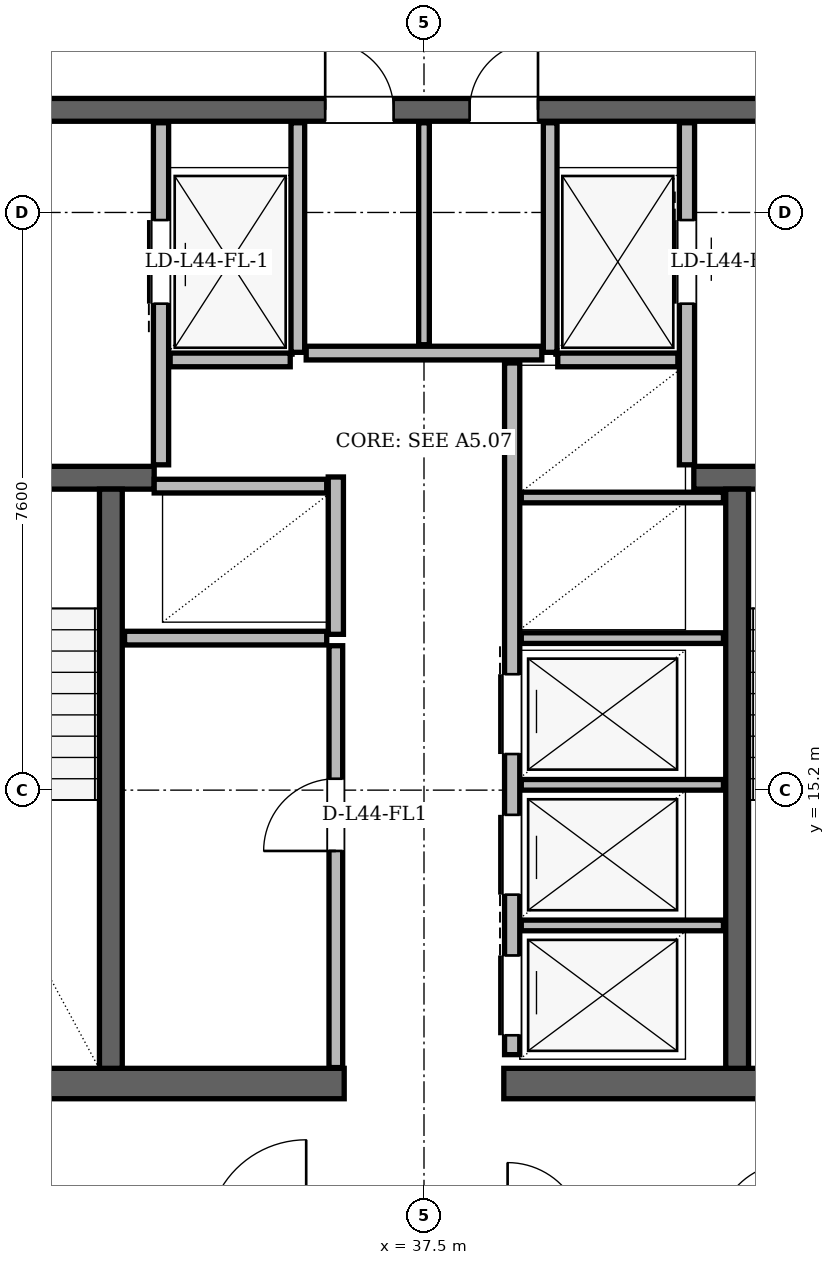
"""IFC4 building model, lengths in metres.
Left out: names, types, materials, properties, quantities, classifications, styles, units other than length and angle.
Written with IfcOpenShell. Run it as: python <this file> out.ifc"""

import sys

from ifc_helpers import new_model, si_unit, direction, frame, frame_2d, origin, place, context, subcontext, project, spatial, rectangle, extrude, element, fill, save


model = new_model("IFC4")
c1 = context("Model", 3, precision=1e-05, world=origin(), true_north=direction((0.0, 1.0)))
c2 = subcontext(c1, "Body", "Model", "MODEL_VIEW")
j1 = project(units=[si_unit("LENGTHUNIT", "METRE"), si_unit("PLANEANGLEUNIT", "RADIAN")], contexts=[c1])
p1 = place(None, origin())
s1 = spatial("IfcSite", under=j1, at=p1, CompositionType="ELEMENT")
p2 = place(p1, origin())
s2 = spatial("IfcBuilding", under=s1, at=p2, CompositionType="ELEMENT")
p3 = place(p2, frame((0.0, 0.0, 167.4)))
s3 = spatial("IfcBuildingStorey", under=s2, at=p3, CompositionType="ELEMENT", Elevation=167.4)
for number, where, z_axis, x_axis in (
    (1, (29.35, 11.34, 0.0), (0.0, 0.0, 1.0), (1.0, 0.0, 0.0)),
    (2, (38.55, 11.34, 0.0), (0.0, 0.0, 1.0), (1.0, 0.0, 0.0)),
):
    element("IfcWall", number, at=place(p3, frame(where, z_axis=z_axis, x_axis=x_axis)), inside=s3, PredefinedType="SHEAR", context=c2, shape_type="SweptSolid", body=[
        extrude(rectangle(XDim=7.1, YDim=0.4, at=frame_2d((3.55, 0.0))), origin(), (0.0, 0.0, 1.0), 3.38),
    ])
p4 = place(p3, frame((29.65, 24.15, 0.0), z_axis=(0.0, 0.0, 1.0), x_axis=(1.0, 0.0, 0.0)))
e3 = element("IfcWall", 3, at=p4, inside=s3, PredefinedType="SHEAR", context=c2, shape_type="SweptSolid", body=[
    extrude(rectangle(XDim=15.7, YDim=0.3, at=frame_2d((7.85, 0.0))), origin(), (0.0, 0.0, 1.0), 3.38),
])
p5 = place(p4, frame((1.7, 0.0, 0.0)))
e4 = element("IfcOpeningElement", 4, at=p5, cuts=e3, PredefinedType="OPENING", context=c2, shape_type="SweptSolid", body=[
    extrude(rectangle(XDim=1.2, YDim=2.2, at=frame_2d((0.6, 1.1))), frame((0.0, 0.15, 0.0), z_axis=(0.0, -1.0, 0.0), x_axis=(1.0, 0.0, 0.0)), (0.0, 0.0, 1.0), 0.3),
])
p6 = place(p4, frame((12.8, 0.0, 0.0)))
e5 = element("IfcOpeningElement", 5, at=p6, cuts=e3, PredefinedType="OPENING", context=c2, shape_type="SweptSolid", body=[
    extrude(rectangle(XDim=1.2, YDim=2.2, at=frame_2d((0.6, 1.1))), frame((0.0, 0.15, 0.0), z_axis=(0.0, -1.0, 0.0), x_axis=(1.0, 0.0, 0.0)), (0.0, 0.0, 1.0), 0.3),
])
p7 = place(p4, frame((6.55, 0.0, 0.0)))
e6 = element("IfcOpeningElement", 6, at=p7, cuts=e3, PredefinedType="OPENING", context=c2, shape_type="SweptSolid", body=[
    extrude(rectangle(XDim=0.9, YDim=2.05, at=frame_2d((0.45, 1.025))), frame((0.0, 0.15, 0.0), z_axis=(0.0, -1.0, 0.0), x_axis=(1.0, 0.0, 0.0)), (0.0, 0.0, 1.0), 0.3),
])
p8 = place(p4, frame((8.45, 0.0, 0.0)))
e7 = element("IfcOpeningElement", 7, at=p8, cuts=e3, PredefinedType="OPENING", context=c2, shape_type="SweptSolid", body=[
    extrude(rectangle(XDim=0.9, YDim=2.05, at=frame_2d((0.45, 1.025))), frame((0.0, 0.15, 0.0), z_axis=(0.0, -1.0, 0.0), x_axis=(1.0, 0.0, 0.0)), (0.0, 0.0, 1.0), 0.3),
])
p9 = place(p3, frame((29.94, 19.31, 0.0), z_axis=(0.0, 0.0, 1.0), x_axis=(1.0, 0.0, 0.0)))
e8 = element("IfcWall", 8, at=p9, inside=s3, PredefinedType="SHEAR", context=c2, shape_type="SweptSolid", body=[
    extrude(rectangle(XDim=4.01, YDim=0.3, at=frame_2d((2.005, 0.0))), origin(), (0.0, 0.0, 1.0), 3.38),
])
p10 = place(p9, frame((1.01, 0.0, 0.0)))
e9 = element("IfcOpeningElement", 9, at=p10, cuts=e8, PredefinedType="OPENING", context=c2, shape_type="SweptSolid", body=[
    extrude(rectangle(XDim=1.4, YDim=2.2, at=frame_2d((0.7, 1.1))), frame((0.0, 0.15, 0.0), z_axis=(0.0, -1.0, 0.0), x_axis=(1.0, 0.0, 0.0)), (0.0, 0.0, 1.0), 0.3),
])
p11 = place(p3, frame((41.05, 19.31, 0.0), z_axis=(0.0, 0.0, 1.0), x_axis=(1.0, 0.0, 0.0)))
e10 = element("IfcWall", 10, at=p11, inside=s3, PredefinedType="SHEAR", context=c2, shape_type="SweptSolid", body=[
    extrude(rectangle(XDim=4.01, YDim=0.3, at=frame_2d((2.005, 0.0))), origin(), (0.0, 0.0, 1.0), 3.38),
])
p12 = place(p11, frame((1.6, 0.0, 0.0)))
e11 = element("IfcOpeningElement", 11, at=p12, cuts=e10, PredefinedType="OPENING", context=c2, shape_type="SweptSolid", body=[
    extrude(rectangle(XDim=1.4, YDim=2.2, at=frame_2d((0.7, 1.1))), frame((0.0, 0.15, 0.0), z_axis=(0.0, -1.0, 0.0), x_axis=(1.0, 0.0, 0.0)), (0.0, 0.0, 1.0), 0.3),
])
for number, where, z_axis, x_axis in (
    (12, (33.38, 11.54, 0.0), (0.0, 0.0, 1.0), (0.0, 1.0, 0.0)),
    (13, (41.62, 11.54, 0.0), (0.0, 0.0, 1.0), (0.0, 1.0, 0.0)),
):
    element("IfcWall", number, at=place(p3, frame(where, z_axis=z_axis, x_axis=x_axis)), inside=s3, PredefinedType="SHEAR", context=c2, shape_type="SweptSolid", body=[
        extrude(rectangle(XDim=7.62, YDim=0.3, at=frame_2d((3.81, 0.0))), origin(), (0.0, 0.0, 1.0), 3.38),
    ])
p13 = place(p3, frame((59.756, 12.279, 0.0), z_axis=(0.0, 0.0, 1.0), x_axis=(-0.499997523705, 0.86602683347, 0.0)))
e14 = element("IfcWall", 14, at=p13, inside=s3, PredefinedType="SOLIDWALL", context=c2, shape_type="SweptSolid", body=[
    extrude(rectangle(XDim=35.802, YDim=0.29, at=frame_2d((17.901, 0.0))), origin(), (0.0, 0.0, 1.0), 2.6),
])
p14 = place(p13, frame((6.579, 0.0, 0.0)))
e15 = element("IfcOpeningElement", 15, at=p14, cuts=e14, PredefinedType="OPENING", context=c2, shape_type="SweptSolid", body=[
    extrude(rectangle(XDim=1.5, YDim=2.2, at=frame_2d((0.75, 1.1))), frame((0.0, 0.145, 0.0), z_axis=(0.0, -1.0, 0.0), x_axis=(1.0, 0.0, 0.0)), (0.0, 0.0, 1.0), 0.29),
])
p15 = place(p13, frame((26.158, 0.0, 0.0)))
e16 = element("IfcOpeningElement", 16, at=p15, cuts=e14, PredefinedType="OPENING", context=c2, shape_type="SweptSolid", body=[
    extrude(rectangle(XDim=1.3, YDim=2.2, at=frame_2d((0.65, 1.1))), frame((0.0, 0.145, 0.0), z_axis=(0.0, -1.0, 0.0), x_axis=(1.0, 0.0, 0.0)), (0.0, 0.0, 1.0), 0.29),
])
p16 = place(p13, frame((1.25, 0.0, 0.85)))
e17 = element("IfcOpeningElement", 17, at=p16, cuts=e14, PredefinedType="OPENING", context=c2, shape_type="SweptSolid", body=[
    extrude(rectangle(XDim=1.2, YDim=1.48, at=frame_2d((0.6, 0.74))), frame((0.0, 0.145, 0.0), z_axis=(0.0, -1.0, 0.0), x_axis=(1.0, 0.0, 0.0)), (0.0, 0.0, 1.0), 0.29),
])
p17 = place(p13, frame((17.033, 0.0, 0.85)))
e18 = element("IfcOpeningElement", 18, at=p17, cuts=e14, PredefinedType="OPENING", context=c2, shape_type="SweptSolid", body=[
    extrude(rectangle(XDim=2.6, YDim=1.64, at=frame_2d((1.3, 0.82))), frame((0.0, 0.145, 0.0), z_axis=(0.0, -1.0, 0.0), x_axis=(1.0, 0.0, 0.0)), (0.0, 0.0, 1.0), 0.29),
])
p18 = place(p13, frame((21.982, 0.0, 0.85)))
e19 = element("IfcOpeningElement", 19, at=p18, cuts=e14, PredefinedType="OPENING", context=c2, shape_type="SweptSolid", body=[
    extrude(rectangle(XDim=2.0, YDim=1.64, at=frame_2d((1.0, 0.82))), frame((0.0, 0.145, 0.0), z_axis=(0.0, -1.0, 0.0), x_axis=(1.0, 0.0, 0.0)), (0.0, 0.0, 1.0), 0.29),
])
p19 = place(p13, frame((13.347, 0.0, 0.85)))
e20 = element("IfcOpeningElement", 20, at=p19, cuts=e14, PredefinedType="OPENING", context=c2, shape_type="SweptSolid", body=[
    extrude(rectangle(XDim=1.6, YDim=1.64, at=frame_2d((0.8, 0.82))), frame((0.0, 0.145, 0.0), z_axis=(0.0, -1.0, 0.0), x_axis=(1.0, 0.0, 0.0)), (0.0, 0.0, 1.0), 0.29),
])
p20 = place(p13, frame((31.619, 0.0, 0.85)))
e21 = element("IfcOpeningElement", 21, at=p20, cuts=e14, PredefinedType="OPENING", context=c2, shape_type="SweptSolid", body=[
    extrude(rectangle(XDim=2.6, YDim=1.64, at=frame_2d((1.3, 0.82))), frame((0.0, 0.145, 0.0), z_axis=(0.0, -1.0, 0.0), x_axis=(1.0, 0.0, 0.0)), (0.0, 0.0, 1.0), 0.29),
])
p21 = place(p3, frame((33.146, 43.285, 0.0), z_axis=(0.0, 0.0, 1.0), x_axis=(-0.499997523705, -0.86602683347, 0.0)))
e22 = element("IfcWall", 22, at=p21, inside=s3, PredefinedType="SOLIDWALL", context=c2, shape_type="SweptSolid", body=[
    extrude(rectangle(XDim=35.802, YDim=0.29, at=frame_2d((17.901, 0.0))), origin(), (0.0, 0.0, 1.0), 2.6),
])
p22 = place(p21, frame((6.76, 0.0, 0.0)))
e23 = element("IfcOpeningElement", 23, at=p22, cuts=e22, PredefinedType="OPENING", context=c2, shape_type="SweptSolid", body=[
    extrude(rectangle(XDim=1.0, YDim=2.18, at=frame_2d((0.5, 1.09))), frame((0.0, 0.145, 0.0), z_axis=(0.0, -1.0, 0.0), x_axis=(1.0, 0.0, 0.0)), (0.0, 0.0, 1.0), 0.29),
])
p23 = place(p21, frame((26.688, 0.0, 0.0)))
e24 = element("IfcOpeningElement", 24, at=p23, cuts=e22, PredefinedType="OPENING", context=c2, shape_type="SweptSolid", body=[
    extrude(rectangle(XDim=1.5, YDim=2.2, at=frame_2d((0.75, 1.1))), frame((0.0, 0.145, 0.0), z_axis=(0.0, -1.0, 0.0), x_axis=(1.0, 0.0, 0.0)), (0.0, 0.0, 1.0), 0.29),
])
p24 = place(p21, frame((33.698, 0.0, 0.85)))
e25 = element("IfcOpeningElement", 25, at=p24, cuts=e22, PredefinedType="OPENING", context=c2, shape_type="SweptSolid", body=[
    extrude(rectangle(XDim=1.2, YDim=1.48, at=frame_2d((0.6, 0.74))), frame((0.0, 0.145, 0.0), z_axis=(0.0, -1.0, 0.0), x_axis=(1.0, 0.0, 0.0)), (0.0, 0.0, 1.0), 0.29),
])
p25 = place(p21, frame((22.123, 0.0, 0.85)))
e26 = element("IfcOpeningElement", 26, at=p25, cuts=e22, PredefinedType="OPENING", context=c2, shape_type="SweptSolid", body=[
    extrude(rectangle(XDim=1.2, YDim=1.48, at=frame_2d((0.6, 0.74))), frame((0.0, 0.145, 0.0), z_axis=(0.0, -1.0, 0.0), x_axis=(1.0, 0.0, 0.0)), (0.0, 0.0, 1.0), 0.29),
])
p26 = place(p21, frame((12.284, 0.0, 0.85)))
e27 = element("IfcOpeningElement", 27, at=p26, cuts=e22, PredefinedType="OPENING", context=c2, shape_type="SweptSolid", body=[
    extrude(rectangle(XDim=1.6, YDim=1.64, at=frame_2d((0.8, 0.82))), frame((0.0, 0.145, 0.0), z_axis=(0.0, -1.0, 0.0), x_axis=(1.0, 0.0, 0.0)), (0.0, 0.0, 1.0), 0.29),
])
p27 = place(p21, frame((17.539, 0.0, 0.85)))
e28 = element("IfcOpeningElement", 28, at=p27, cuts=e22, PredefinedType="OPENING", context=c2, shape_type="SweptSolid", body=[
    extrude(rectangle(XDim=3.0, YDim=1.64, at=frame_2d((1.5, 0.82))), frame((0.0, 0.145, 0.0), z_axis=(0.0, -1.0, 0.0), x_axis=(1.0, 0.0, 0.0)), (0.0, 0.0, 1.0), 0.29),
])
p28 = place(p21, frame((1.23, 0.0, 0.85)))
e29 = element("IfcOpeningElement", 29, at=p28, cuts=e22, PredefinedType="OPENING", context=c2, shape_type="SweptSolid", body=[
    extrude(rectangle(XDim=1.2, YDim=1.48, at=frame_2d((0.6, 0.74))), frame((0.0, 0.145, 0.0), z_axis=(0.0, -1.0, 0.0), x_axis=(1.0, 0.0, 0.0)), (0.0, 0.0, 1.0), 0.29),
])
p29 = place(p21, frame((30.487, 0.0, 0.85)))
e30 = element("IfcOpeningElement", 30, at=p29, cuts=e22, PredefinedType="OPENING", context=c2, shape_type="SweptSolid", body=[
    extrude(rectangle(XDim=1.2, YDim=1.48, at=frame_2d((0.6, 0.74))), frame((0.0, 0.145, 0.0), z_axis=(0.0, -1.0, 0.0), x_axis=(1.0, 0.0, 0.0)), (0.0, 0.0, 1.0), 0.29),
])
p30 = place(p3, frame((34.04, 19.48, 0.0), z_axis=(0.0, 0.0, 1.0), x_axis=(0.0, 1.0, 0.0)))
e31 = element("IfcWall", 31, at=p30, inside=s3, PredefinedType="PARTITIONING", context=c2, shape_type="SweptSolid", body=[
    extrude(rectangle(XDim=4.5, YDim=0.2, at=frame_2d((2.25, 0.0))), origin(), (0.0, 0.0, 1.0), 3.38),
])
p31 = place(p30, frame((2.12, 0.0, 0.0)))
e32 = element("IfcOpeningElement", 32, at=p31, cuts=e31, PredefinedType="OPENING", context=c2, shape_type="SweptSolid", body=[
    extrude(rectangle(XDim=1.1, YDim=2.2, at=frame_2d((0.55, 1.1))), frame((0.0, 0.1, 0.0), z_axis=(0.0, -1.0, 0.0), x_axis=(1.0, 0.0, 0.0)), (0.0, 0.0, 1.0), 0.2),
])
p32 = place(p3, frame((35.84, 20.96, 0.0), z_axis=(0.0, 0.0, 1.0), x_axis=(0.0, 1.0, 0.0)))
e33 = element("IfcWall", 33, at=p32, inside=s3, PredefinedType="PARTITIONING", context=c2, shape_type="SweptSolid", body=[
    extrude(rectangle(XDim=3.02, YDim=0.18, at=frame_2d((1.51, 0.0))), origin(), (0.0, 0.0, 1.0), 3.38),
])
p33 = place(p3, frame((34.16, 20.86, 0.0), z_axis=(0.0, 0.0, 1.0), x_axis=(1.0, 0.0, 0.0)))
e34 = element("IfcWall", 34, at=p33, inside=s3, PredefinedType="PARTITIONING", context=c2, shape_type="SweptSolid", body=[
    extrude(rectangle(XDim=1.58, YDim=0.18, at=frame_2d((0.79, 0.0))), origin(), (0.0, 0.0, 1.0), 3.38),
])
p34 = place(p3, frame((40.96, 19.48, 0.0), z_axis=(0.0, 0.0, 1.0), x_axis=(0.0, 1.0, 0.0)))
e35 = element("IfcWall", 35, at=p34, inside=s3, PredefinedType="PARTITIONING", context=c2, shape_type="SweptSolid", body=[
    extrude(rectangle(XDim=4.5, YDim=0.2, at=frame_2d((2.25, 0.0))), origin(), (0.0, 0.0, 1.0), 3.38),
])
p35 = place(p34, frame((2.12, 0.0, 0.0)))
e36 = element("IfcOpeningElement", 36, at=p35, cuts=e35, PredefinedType="OPENING", context=c2, shape_type="SweptSolid", body=[
    extrude(rectangle(XDim=1.1, YDim=2.2, at=frame_2d((0.55, 1.1))), frame((0.0, 0.1, 0.0), z_axis=(0.0, -1.0, 0.0), x_axis=(1.0, 0.0, 0.0)), (0.0, 0.0, 1.0), 0.2),
])
p36 = place(p3, frame((39.16, 20.96, 0.0), z_axis=(0.0, 0.0, 1.0), x_axis=(0.0, 1.0, 0.0)))
e37 = element("IfcWall", 37, at=p36, inside=s3, PredefinedType="PARTITIONING", context=c2, shape_type="SweptSolid", body=[
    extrude(rectangle(XDim=3.02, YDim=0.18, at=frame_2d((1.51, 0.0))), origin(), (0.0, 0.0, 1.0), 3.38),
])
p37 = place(p3, frame((39.26, 20.86, 0.0), z_axis=(0.0, 0.0, 1.0), x_axis=(1.0, 0.0, 0.0)))
e38 = element("IfcWall", 38, at=p37, inside=s3, PredefinedType="PARTITIONING", context=c2, shape_type="SweptSolid", body=[
    extrude(rectangle(XDim=1.58, YDim=0.18, at=frame_2d((0.79, 0.0))), origin(), (0.0, 0.0, 1.0), 3.38),
])
p38 = place(p3, frame((36.34, 17.25, 0.0), z_axis=(0.0, 0.0, 1.0), x_axis=(0.0, 1.0, 0.0)))
e39 = element("IfcWall", 39, at=p38, inside=s3, PredefinedType="PARTITIONING", context=c2, shape_type="SweptSolid", body=[
    extrude(rectangle(XDim=2.07, YDim=0.2, at=frame_2d((1.035, 0.0))), origin(), (0.0, 0.0, 1.0), 3.38),
])
p39 = place(p3, frame((33.95, 19.2, 0.0), z_axis=(0.0, 0.0, 1.0), x_axis=(1.0, 0.0, 0.0)))
e40 = element("IfcWall", 40, at=p39, inside=s3, PredefinedType="PARTITIONING", context=c2, shape_type="SweptSolid", body=[
    extrude(rectangle(XDim=2.27, YDim=0.18, at=frame_2d((1.135, 0.0))), origin(), (0.0, 0.0, 1.0), 3.38),
])
p40 = place(p3, frame((33.56, 17.2, 0.0), z_axis=(0.0, 0.0, 1.0), x_axis=(1.0, 0.0, 0.0)))
e41 = element("IfcWall", 41, at=p40, inside=s3, PredefinedType="PARTITIONING", context=c2, shape_type="SweptSolid", body=[
    extrude(rectangle(XDim=2.66, YDim=0.18, at=frame_2d((1.33, 0.0))), origin(), (0.0, 0.0, 1.0), 3.38),
])
p41 = place(p3, frame((36.34, 11.55, 0.0), z_axis=(0.0, 0.0, 1.0), x_axis=(0.0, 1.0, 0.0)))
e42 = element("IfcWall", 42, at=p41, inside=s3, PredefinedType="PARTITIONING", context=c2, shape_type="SweptSolid", body=[
    extrude(rectangle(XDim=5.55, YDim=0.18, at=frame_2d((2.775, 0.0))), origin(), (0.0, 0.0, 1.0), 3.38),
])
p42 = place(p41, frame((2.85, 0.0, 0.0)))
e43 = element("IfcOpeningElement", 43, at=p42, cuts=e42, PredefinedType="OPENING", context=c2, shape_type="SweptSolid", body=[
    extrude(rectangle(XDim=0.95, YDim=2.1, at=frame_2d((0.475, 1.05))), frame((0.0, 0.09, 0.0), z_axis=(0.0, -1.0, 0.0), x_axis=(1.0, 0.0, 0.0)), (0.0, 0.0, 1.0), 0.18),
])
p43 = place(p3, frame((38.66, 11.72, 0.0), z_axis=(0.0, 0.0, 1.0), x_axis=(0.0, 1.0, 0.0)))
e44 = element("IfcWall", 44, at=p43, inside=s3, PredefinedType="PARTITIONING", context=c2, shape_type="SweptSolid", body=[
    extrude(rectangle(XDim=9.1, YDim=0.2, at=frame_2d((4.55, 0.0))), origin(), (0.0, 0.0, 1.0), 3.38),
])
p44 = place(p43, frame((0.255, 0.0, 0.0)))
e45 = element("IfcOpeningElement", 45, at=p44, cuts=e44, PredefinedType="OPENING", context=c2, shape_type="SweptSolid", body=[
    extrude(rectangle(XDim=1.05, YDim=2.15, at=frame_2d((0.525, 1.075))), frame((0.0, 0.1, 0.0), z_axis=(0.0, -1.0, 0.0), x_axis=(1.0, 0.0, 0.0)), (0.0, 0.0, 1.0), 0.2),
])
p45 = place(p43, frame((2.105, 0.0, 0.0)))
e46 = element("IfcOpeningElement", 46, at=p45, cuts=e44, PredefinedType="OPENING", context=c2, shape_type="SweptSolid", body=[
    extrude(rectangle(XDim=1.05, YDim=2.15, at=frame_2d((0.525, 1.075))), frame((0.0, 0.1, 0.0), z_axis=(0.0, -1.0, 0.0), x_axis=(1.0, 0.0, 0.0)), (0.0, 0.0, 1.0), 0.2),
])
p46 = place(p43, frame((3.955, 0.0, 0.0)))
e47 = element("IfcOpeningElement", 47, at=p46, cuts=e44, PredefinedType="OPENING", context=c2, shape_type="SweptSolid", body=[
    extrude(rectangle(XDim=1.05, YDim=2.15, at=frame_2d((0.525, 1.075))), frame((0.0, 0.1, 0.0), z_axis=(0.0, -1.0, 0.0), x_axis=(1.0, 0.0, 0.0)), (0.0, 0.0, 1.0), 0.2),
])
for number, where, z_axis, x_axis in (
    (48, (38.78, 13.42, 0.0), (0.0, 0.0, 1.0), (1.0, 0.0, 0.0)),
    (49, (38.78, 15.27, 0.0), (0.0, 0.0, 1.0), (1.0, 0.0, 0.0)),
    (50, (38.78, 17.2, 0.0), (0.0, 0.0, 1.0), (1.0, 0.0, 0.0)),
    (51, (38.78, 19.05, 0.0), (0.0, 0.0, 1.0), (1.0, 0.0, 0.0)),
):
    element("IfcWall", number, at=place(p3, frame(where, z_axis=z_axis, x_axis=x_axis)), inside=s3, PredefinedType="PARTITIONING", context=c2, shape_type="SweptSolid", body=[
        extrude(rectangle(XDim=2.66, YDim=0.14, at=frame_2d((1.33, 0.0))), origin(), (0.0, 0.0, 1.0), 3.38),
    ])
p47 = place(p3, frame((35.95, 20.95, 0.0), z_axis=(0.0, 0.0, 1.0), x_axis=(1.0, 0.0, 0.0)))
e52 = element("IfcWall", 52, at=p47, inside=s3, PredefinedType="PARTITIONING", context=c2, shape_type="SweptSolid", body=[
    extrude(rectangle(XDim=3.1, YDim=0.18, at=frame_2d((1.55, 0.0))), origin(), (0.0, 0.0, 1.0), 3.38),
])
p48 = place(p3, frame((37.5, 21.06, 0.0), z_axis=(0.0, 0.0, 1.0), x_axis=(0.0, 1.0, 0.0)))
e53 = element("IfcWall", 53, at=p48, inside=s3, PredefinedType="PARTITIONING", context=c2, shape_type="SweptSolid", body=[
    extrude(rectangle(XDim=2.92, YDim=0.14, at=frame_2d((1.46, 0.0))), origin(), (0.0, 0.0, 1.0), 3.38),
])
p49 = place(p42, origin())
e54 = element("IfcDoor", 54, at=p49, inside=s3, OperationType="SINGLE_SWING_LEFT", PredefinedType="DOOR", context=c2, shape_type="SweptSolid", body=[
    extrude(rectangle(XDim=0.95, YDim=2.1, at=frame_2d((0.475, 1.05))), frame((0.0, 0.025, 0.0), z_axis=(0.0, -1.0, 0.0), x_axis=(1.0, 0.0, 0.0)), (0.0, 0.0, 1.0), 0.05),
])
fill(e43, e54)
p50 = place(p31, origin())
e55 = element("IfcDoor", 55, at=p50, inside=s3, OperationType="SLIDING_TO_LEFT", PredefinedType="DOOR", context=c2, shape_type="SweptSolid", body=[
    extrude(rectangle(XDim=1.1, YDim=2.2, at=frame_2d((0.55, 1.1))), frame((0.0, 0.025, 0.0), z_axis=(0.0, -1.0, 0.0), x_axis=(1.0, 0.0, 0.0)), (0.0, 0.0, 1.0), 0.05),
])
fill(e32, e55)
p51 = place(p35, origin())
e56 = element("IfcDoor", 56, at=p51, inside=s3, OperationType="SLIDING_TO_RIGHT", PredefinedType="DOOR", context=c2, shape_type="SweptSolid", body=[
    extrude(rectangle(XDim=1.1, YDim=2.2, at=frame_2d((0.55, 1.1))), frame((0.0, 0.025, 0.0), z_axis=(0.0, -1.0, 0.0), x_axis=(1.0, 0.0, 0.0)), (0.0, 0.0, 1.0), 0.05),
])
fill(e36, e56)
p52 = place(p44, origin())
e57 = element("IfcDoor", 57, at=p52, inside=s3, OperationType="SLIDING_TO_RIGHT", PredefinedType="DOOR", context=c2, shape_type="SweptSolid", body=[
    extrude(rectangle(XDim=1.05, YDim=2.15, at=frame_2d((0.525, 1.075))), frame((0.0, 0.025, 0.0), z_axis=(0.0, -1.0, 0.0), x_axis=(1.0, 0.0, 0.0)), (0.0, 0.0, 1.0), 0.05),
])
fill(e45, e57)
p53 = place(p45, origin())
e58 = element("IfcDoor", 58, at=p53, inside=s3, OperationType="SLIDING_TO_LEFT", PredefinedType="DOOR", context=c2, shape_type="SweptSolid", body=[
    extrude(rectangle(XDim=1.05, YDim=2.15, at=frame_2d((0.525, 1.075))), frame((0.0, 0.025, 0.0), z_axis=(0.0, -1.0, 0.0), x_axis=(1.0, 0.0, 0.0)), (0.0, 0.0, 1.0), 0.05),
])
fill(e46, e58)
p54 = place(p46, origin())
e59 = element("IfcDoor", 59, at=p54, inside=s3, OperationType="SLIDING_TO_RIGHT", PredefinedType="DOOR", context=c2, shape_type="SweptSolid", body=[
    extrude(rectangle(XDim=1.05, YDim=2.15, at=frame_2d((0.525, 1.075))), frame((0.0, 0.025, 0.0), z_axis=(0.0, -1.0, 0.0), x_axis=(1.0, 0.0, 0.0)), (0.0, 0.0, 1.0), 0.05),
])
fill(e47, e59)
p55 = place(p7, origin())
e60 = element("IfcDoor", 60, at=p55, inside=s3, OperationType="SINGLE_SWING_LEFT", PredefinedType="DOOR", context=c2, shape_type="SweptSolid", body=[
    extrude(rectangle(XDim=0.9, YDim=2.05, at=frame_2d((0.45, 1.025))), frame((0.0, 0.025, 0.0), z_axis=(0.0, -1.0, 0.0), x_axis=(1.0, 0.0, 0.0)), (0.0, 0.0, 1.0), 0.05),
])
fill(e6, e60)
p56 = place(p8, origin())
e61 = element("IfcDoor", 61, at=p56, inside=s3, OperationType="SINGLE_SWING_RIGHT", PredefinedType="DOOR", context=c2, shape_type="SweptSolid", body=[
    extrude(rectangle(XDim=0.9, YDim=2.05, at=frame_2d((0.45, 1.025))), frame((0.0, 0.025, 0.0), z_axis=(0.0, -1.0, 0.0), x_axis=(1.0, 0.0, 0.0)), (0.0, 0.0, 1.0), 0.05),
])
fill(e7, e61)
save(model, sys.argv[1])
